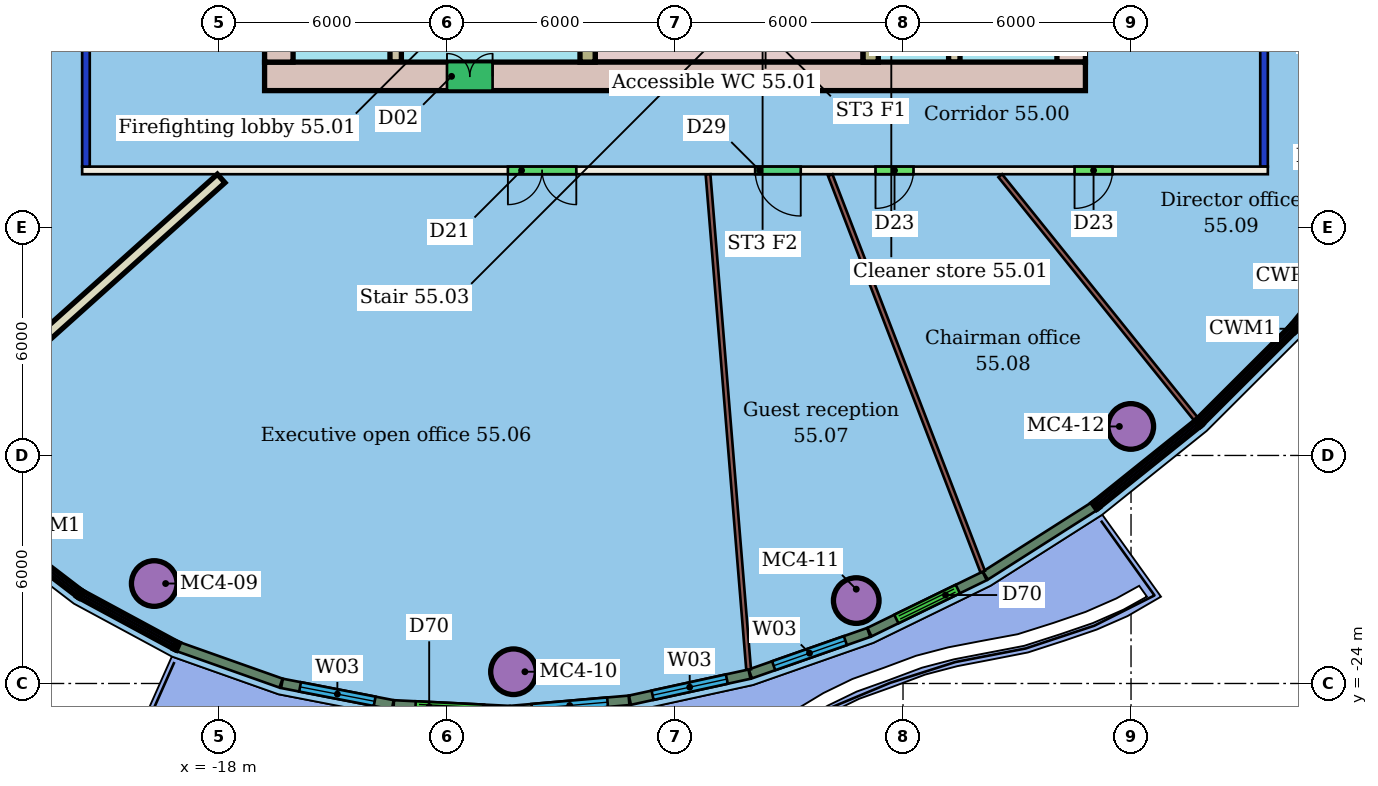
"""IFC4 building model, lengths in metres.
Left out: names, types, materials, properties, quantities, classifications, styles, units other than length and angle.
Written with IfcOpenShell. Run it as: python <this file> out.ifc"""

import sys

from ifc_helpers import new_model, si_unit, direction, frame, frame_2d, origin, origin_2d, place, context, subcontext, project, spatial, rectangle, hollow_circle, extrude, element, fill, save


model = new_model("IFC4")
c1 = context("Model", 3, precision=1e-05, world=origin(), true_north=direction((0.0, 1.0)))
c2 = subcontext(c1, "Body", "Model", "MODEL_VIEW")
j1 = project(units=[si_unit("LENGTHUNIT", "METRE"), si_unit("PLANEANGLEUNIT", "RADIAN")], contexts=[c1])
p1 = place(None, origin())
s1 = spatial("IfcSite", under=j1, at=p1, CompositionType="ELEMENT")
p2 = place(p1, origin())
s2 = spatial("IfcBuilding", under=s1, at=p2, CompositionType="ELEMENT")
p3 = place(p2, frame((0.0, 0.0, 224.5)))
s3 = spatial("IfcBuildingStorey", under=s2, at=p3, CompositionType="ELEMENT", Elevation=224.5)
for number, where, z_axis, x_axis in (
    (1, (-19.704, -21.37, 0.0), (0.0, 0.0, 1.0), (1.0, 0.0, 0.0)),
    (2, (-10.25, -23.691, 0.0), (0.0, 0.0, 1.0), (1.0, 0.0, 0.0)),
    (3, (-1.231, -21.819, 0.0), (0.0, 0.0, 1.0), (1.0, 0.0, 0.0)),
    (4, (5.993, -17.237, 0.0), (0.0, 0.0, 1.0), (1.0, 0.0, 0.0)),
):
    element("IfcColumn", number, at=place(p3, frame(where, z_axis=z_axis, x_axis=x_axis)), inside=s3, PredefinedType="COLUMN", context=c2, shape_type="SweptSolid", body=[
        extrude(hollow_circle(Radius=0.6, WallThickness=0.045, at=origin_2d()), origin(), (0.0, 0.0, 1.0), 3.45),
    ])
p4 = place(p3, frame((9.6, -10.5, 0.0), z_axis=(0.0, 0.0, 1.0), x_axis=(-1.0, 0.0, 0.0)))
e5 = element("IfcWall", 5, at=p4, inside=s3, PredefinedType="PARTITIONING", context=c2, shape_type="SweptSolid", body=[
    extrude(rectangle(XDim=31.2, YDim=0.2, at=frame_2d((15.6, 0.0))), origin(), (0.0, 0.0, 1.0), 3.45),
])
p5 = place(p4, frame((18.197, 0.0, 0.0)))
e6 = element("IfcOpeningElement", 6, at=p5, cuts=e5, PredefinedType="OPENING", context=c2, shape_type="SweptSolid", body=[
    extrude(rectangle(XDim=1.8, YDim=2.1, at=frame_2d((0.9, 1.05))), frame((0.0, 0.11, 0.0), z_axis=(0.0, -1.0, 0.0), x_axis=(1.0, 0.0, 0.0)), (0.0, 0.0, 1.0), 0.22),
])
p6 = place(p4, frame((12.291, 0.0, 0.0)))
e7 = element("IfcOpeningElement", 7, at=p6, cuts=e5, PredefinedType="OPENING", context=c2, shape_type="SweptSolid", body=[
    extrude(rectangle(XDim=1.2, YDim=2.4, at=frame_2d((0.6, 1.2))), frame((0.0, 0.11, 0.0), z_axis=(0.0, -1.0, 0.0), x_axis=(1.0, 0.0, 0.0)), (0.0, 0.0, 1.0), 0.22),
])
p7 = place(p4, frame((9.324, 0.0, 0.0)))
e8 = element("IfcOpeningElement", 8, at=p7, cuts=e5, PredefinedType="OPENING", context=c2, shape_type="SweptSolid", body=[
    extrude(rectangle(XDim=1.0, YDim=2.4, at=frame_2d((0.5, 1.2))), frame((0.0, 0.11, 0.0), z_axis=(0.0, -1.0, 0.0), x_axis=(1.0, 0.0, 0.0)), (0.0, 0.0, 1.0), 0.22),
])
p8 = place(p4, frame((4.086, 0.0, 0.0)))
e9 = element("IfcOpeningElement", 9, at=p8, cuts=e5, PredefinedType="OPENING", context=c2, shape_type="SweptSolid", body=[
    extrude(rectangle(XDim=1.0, YDim=2.4, at=frame_2d((0.5, 1.2))), frame((0.0, 0.11, 0.0), z_axis=(0.0, -1.0, 0.0), x_axis=(1.0, 0.0, 0.0)), (0.0, 0.0, 1.0), 0.22),
])
p9 = place(p3, frame((-21.5, -10.4, 0.0), z_axis=(0.0, 0.0, 1.0), x_axis=(0.0, 1.0, 0.0)))
e10 = element("IfcWall", 10, at=p9, inside=s3, PredefinedType="PARTITIONING", context=c2, shape_type="SweptSolid", body=[
    extrude(rectangle(XDim=20.8, YDim=0.2, at=frame_2d((10.4, 0.0))), origin(), (0.0, 0.0, 1.0), 3.05),
])
p10 = place(p9, frame((14.754, 0.0, 0.0)))
e11 = element("IfcOpeningElement", 11, at=p10, cuts=e10, PredefinedType="OPENING", context=c2, shape_type="SweptSolid", body=[
    extrude(rectangle(XDim=1.0, YDim=2.4, at=frame_2d((0.5, 1.2))), frame((0.0, 0.11, 0.0), z_axis=(0.0, -1.0, 0.0), x_axis=(1.0, 0.0, 0.0)), (0.0, 0.0, 1.0), 0.22),
])
p11 = place(p9, frame((7.034, 0.0, 0.0)))
e12 = element("IfcOpeningElement", 12, at=p11, cuts=e10, PredefinedType="OPENING", context=c2, shape_type="SweptSolid", body=[
    extrude(rectangle(XDim=1.8, YDim=2.4, at=frame_2d((0.9, 1.2))), frame((0.0, 0.11, 0.0), z_axis=(0.0, -1.0, 0.0), x_axis=(1.0, 0.0, 0.0)), (0.0, 0.0, 1.0), 0.22),
])
p12 = place(p3, frame((9.5, 10.4, 0.0), z_axis=(0.0, 0.0, 1.0), x_axis=(0.0, -1.0, 0.0)))
e13 = element("IfcWall", 13, at=p12, inside=s3, PredefinedType="PARTITIONING", context=c2, shape_type="SweptSolid", body=[
    extrude(rectangle(XDim=20.8, YDim=0.2, at=frame_2d((10.4, 0.0))), origin(), (0.0, 0.0, 1.0), 3.05),
])
p13 = place(p12, frame((13.631, 0.0, 0.0)))
e14 = element("IfcOpeningElement", 14, at=p13, cuts=e13, PredefinedType="OPENING", context=c2, shape_type="SweptSolid", body=[
    extrude(rectangle(XDim=0.9, YDim=2.1, at=frame_2d((0.45, 1.05))), frame((0.0, 0.11, 0.0), z_axis=(0.0, -1.0, 0.0), x_axis=(1.0, 0.0, 0.0)), (0.0, 0.0, 1.0), 0.22),
])
p14 = place(p12, frame((7.823, 0.0, 0.0)))
e15 = element("IfcOpeningElement", 15, at=p14, cuts=e13, PredefinedType="OPENING", context=c2, shape_type="SweptSolid", body=[
    extrude(rectangle(XDim=1.5, YDim=2.1, at=frame_2d((0.75, 1.05))), frame((0.0, 0.11, 0.0), z_axis=(0.0, -1.0, 0.0), x_axis=(1.0, 0.0, 0.0)), (0.0, 0.0, 1.0), 0.22),
])
p15 = place(p3, frame((-25.794, -17.754, 0.0), z_axis=(0.0, 0.0, 1.0), x_axis=(0.744431366547, 0.667698989441, 0.0)))
e16 = element("IfcWall", 16, at=p15, inside=s3, PredefinedType="PARTITIONING", context=c2, shape_type="SweptSolid", body=[
    extrude(rectangle(XDim=10.547, YDim=0.3, at=frame_2d((5.274, 0.0))), origin(), (0.0, 0.0, 1.0), 3.45),
])
p16 = place(p3, frame((-4.063, -23.631, 0.0), z_axis=(0.0, 0.0, 1.0), x_axis=(-0.081688068258, 0.996657945087, 0.0)))
e17 = element("IfcWall", 17, at=p16, inside=s3, PredefinedType="PARTITIONING", context=c2, shape_type="SweptSolid", body=[
    extrude(rectangle(XDim=13.07, YDim=0.125, at=frame_2d((6.535, 0.0))), origin(), (0.0, 0.0, 1.0), 3.45),
])
p17 = place(p3, frame((2.097, -21.057, 0.0), z_axis=(0.0, 0.0, 1.0), x_axis=(-0.35890151598, 0.933375434553, 0.0)))
e18 = element("IfcWall", 18, at=p17, inside=s3, PredefinedType="PARTITIONING", context=c2, shape_type="SweptSolid", body=[
    extrude(rectangle(XDim=11.179, YDim=0.125, at=frame_2d((5.59, 0.0))), origin(), (0.0, 0.0, 1.0), 3.45),
])
p18 = place(p3, frame((7.706, -17.038, 0.0), z_axis=(0.0, 0.0, 1.0), x_axis=(-0.626795529624, 0.77918378066, 0.0)))
e19 = element("IfcWall", 19, at=p18, inside=s3, PredefinedType="PARTITIONING", context=c2, shape_type="SweptSolid", body=[
    extrude(rectangle(XDim=8.212, YDim=0.125, at=frame_2d((4.106, 0.0))), origin(), (0.0, 0.0, 1.0), 3.45),
])
p19 = place(p3, frame((14.257, -8.927, 0.0), z_axis=(0.0, 0.0, 1.0), x_axis=(-0.915078040673, 0.403276802555, 0.0)))
e20 = element("IfcWall", 20, at=p19, inside=s3, PredefinedType="PARTITIONING", context=c2, shape_type="SweptSolid", body=[
    extrude(rectangle(XDim=5.062, YDim=0.125, at=frame_2d((2.531, 0.0))), origin(), (0.0, 0.0, 1.0), 3.45),
])
p20 = place(p3, frame((-19.066, -23.035, 0.0), z_axis=(0.0, 0.0, 1.0), x_axis=(0.942660771922, -0.333752406852, 0.0)))
e21 = element("IfcWall", 21, at=p20, inside=s3, PredefinedType="SOLIDWALL", context=c2, shape_type="SweptSolid", body=[
    extrude(rectangle(XDim=2.862, YDim=0.25, at=frame_2d((1.431, 0.0))), origin(), (0.0, 0.0, 1.0), 3.1),
])
p21 = place(p3, frame((-16.342, -23.997, 0.0), z_axis=(0.0, 0.0, 1.0), x_axis=(0.981754609907, -0.190152270366, 0.0)))
e22 = element("IfcWall", 22, at=p21, inside=s3, PredefinedType="SOLIDWALL", context=c2, shape_type="SweptSolid", body=[
    extrude(rectangle(XDim=2.97, YDim=0.25, at=frame_2d((1.485, 0.0))), origin(), (0.0, 0.0, 1.0), 3.1),
])
p22 = place(p21, frame((0.485, 0.0, 0.9)))
e23 = element("IfcOpeningElement", 23, at=p22, cuts=e22, PredefinedType="OPENING", context=c2, shape_type="SweptSolid", body=[
    extrude(rectangle(XDim=2.0, YDim=2.1, at=frame_2d((1.0, 1.05))), frame((0.0, 0.135, 0.0), z_axis=(0.0, -1.0, 0.0), x_axis=(1.0, 0.0, 0.0)), (0.0, 0.0, 1.0), 0.27),
])
p23 = place(p3, frame((-13.401, -24.565, 0.0), z_axis=(0.0, 0.0, 1.0), x_axis=(0.99880196675, -0.048934969263, 0.0)))
e24 = element("IfcWall", 24, at=p23, inside=s3, PredefinedType="SOLIDWALL", context=c2, shape_type="SweptSolid", body=[
    extrude(rectangle(XDim=3.048, YDim=0.25, at=frame_2d((1.524, 0.0))), origin(), (0.0, 0.0, 1.0), 3.1),
])
p24 = place(p23, frame((0.574, 0.0, 0.0)))
e25 = element("IfcOpeningElement", 25, at=p24, cuts=e24, PredefinedType="OPENING", context=c2, shape_type="SweptSolid", body=[
    extrude(rectangle(XDim=1.8, YDim=2.4, at=frame_2d((0.9, 1.2))), frame((0.0, 0.135, 0.0), z_axis=(0.0, -1.0, 0.0), x_axis=(1.0, 0.0, 0.0)), (0.0, 0.0, 1.0), 0.27),
])
p25 = place(p3, frame((-10.332, -24.713, 0.0), z_axis=(0.0, 0.0, 1.0), x_axis=(0.996280822504, 0.086165670135, 0.0)))
e26 = element("IfcWall", 26, at=p25, inside=s3, PredefinedType="SOLIDWALL", context=c2, shape_type="SweptSolid", body=[
    extrude(rectangle(XDim=3.134, YDim=0.25, at=frame_2d((1.567, 0.0))), origin(), (0.0, 0.0, 1.0), 3.1),
])
p26 = place(p25, frame((0.567, 0.0, 0.9)))
e27 = element("IfcOpeningElement", 27, at=p26, cuts=e26, PredefinedType="OPENING", context=c2, shape_type="SweptSolid", body=[
    extrude(rectangle(XDim=2.0, YDim=2.1, at=frame_2d((1.0, 1.05))), frame((0.0, 0.135, 0.0), z_axis=(0.0, -1.0, 0.0), x_axis=(1.0, 0.0, 0.0)), (0.0, 0.0, 1.0), 0.27),
])
p27 = place(p3, frame((-7.186, -24.44, 0.0), z_axis=(0.0, 0.0, 1.0), x_axis=(0.977051639929, 0.213002565507, 0.0)))
e28 = element("IfcWall", 28, at=p27, inside=s3, PredefinedType="SOLIDWALL", context=c2, shape_type="SweptSolid", body=[
    extrude(rectangle(XDim=3.22, YDim=0.25, at=frame_2d((1.61, 0.0))), origin(), (0.0, 0.0, 1.0), 3.1),
])
p28 = place(p27, frame((0.61, 0.0, 0.9)))
e29 = element("IfcOpeningElement", 29, at=p28, cuts=e28, PredefinedType="OPENING", context=c2, shape_type="SweptSolid", body=[
    extrude(rectangle(XDim=2.0, YDim=2.1, at=frame_2d((1.0, 1.05))), frame((0.0, 0.135, 0.0), z_axis=(0.0, -1.0, 0.0), x_axis=(1.0, 0.0, 0.0)), (0.0, 0.0, 1.0), 0.27),
])
p29 = place(p3, frame((-4.018, -23.748, 0.0), z_axis=(0.0, 0.0, 1.0), x_axis=(0.943819136109, 0.330462461279, 0.0)))
e30 = element("IfcWall", 30, at=p29, inside=s3, PredefinedType="SOLIDWALL", context=c2, shape_type="SweptSolid", body=[
    extrude(rectangle(XDim=3.3, YDim=0.25, at=frame_2d((1.65, 0.0))), origin(), (0.0, 0.0, 1.0), 3.1),
])
p30 = place(p29, frame((0.65, 0.0, 0.9)))
e31 = element("IfcOpeningElement", 31, at=p30, cuts=e30, PredefinedType="OPENING", context=c2, shape_type="SweptSolid", body=[
    extrude(rectangle(XDim=2.0, YDim=2.1, at=frame_2d((1.0, 1.05))), frame((0.0, 0.135, 0.0), z_axis=(0.0, -1.0, 0.0), x_axis=(1.0, 0.0, 0.0)), (0.0, 0.0, 1.0), 0.27),
])
p31 = place(p3, frame((-0.882, -22.648, 0.0), z_axis=(0.0, 0.0, 1.0), x_axis=(0.898829687596, 0.43829806376, 0.0)))
e32 = element("IfcWall", 32, at=p31, inside=s3, PredefinedType="SOLIDWALL", context=c2, shape_type="SweptSolid", body=[
    extrude(rectangle(XDim=3.371, YDim=0.25, at=frame_2d((1.686, 0.0))), origin(), (0.0, 0.0, 1.0), 3.1),
])
p32 = place(p31, frame((0.786, 0.0, 0.0)))
e33 = element("IfcOpeningElement", 33, at=p32, cuts=e32, PredefinedType="OPENING", context=c2, shape_type="SweptSolid", body=[
    extrude(rectangle(XDim=1.8, YDim=2.4, at=frame_2d((0.9, 1.2))), frame((0.0, 0.135, 0.0), z_axis=(0.0, -1.0, 0.0), x_axis=(1.0, 0.0, 0.0)), (0.0, 0.0, 1.0), 0.27),
])
p33 = place(p3, frame((2.167, -21.16, 0.0), z_axis=(0.0, 0.0, 1.0), x_axis=(0.843780310555, 0.536688724979, 0.0)))
e34 = element("IfcWall", 34, at=p33, inside=s3, PredefinedType="SOLIDWALL", context=c2, shape_type="SweptSolid", body=[
    extrude(rectangle(XDim=3.384, YDim=0.25, at=frame_2d((1.692, 0.0))), origin(), (0.0, 0.0, 1.0), 3.1),
])
p34 = place(p3, frame((-16.8, -8.025, 0.0), z_axis=(0.0, 0.0, 1.0), x_axis=(1.0, 0.0, 0.0)))
e35 = element("IfcWall", 35, at=p34, inside=s3, PredefinedType="SHEAR", context=c2, shape_type="SweptSolid", body=[
    extrude(rectangle(XDim=21.6, YDim=0.75, at=frame_2d((10.8, 0.0))), origin(), (0.0, 0.0, 1.0), 3.3),
])
p35 = place(p34, frame((4.8, 0.0, 0.0)))
e36 = element("IfcOpeningElement", 36, at=p35, cuts=e35, PredefinedType="OPENING", context=c2, shape_type="SweptSolid", body=[
    extrude(rectangle(XDim=1.2, YDim=2.1, at=frame_2d((0.6, 1.05))), frame((0.0, 0.385, 0.0), z_axis=(0.0, -1.0, 0.0), x_axis=(1.0, 0.0, 0.0)), (0.0, 0.0, 1.0), 0.77),
])
p36 = place(p3, frame((-16.425, 7.65, 0.0), z_axis=(0.0, 0.0, 1.0), x_axis=(0.0, -1.0, 0.0)))
e37 = element("IfcWall", 37, at=p36, inside=s3, PredefinedType="SHEAR", context=c2, shape_type="SweptSolid", body=[
    extrude(rectangle(XDim=15.3, YDim=0.75, at=frame_2d((7.65, 0.0))), origin(), (0.0, 0.0, 1.0), 3.3),
])
p37 = place(p36, frame((11.25, 0.0, 0.0)))
e38 = element("IfcOpeningElement", 38, at=p37, cuts=e37, PredefinedType="OPENING", context=c2, shape_type="SweptSolid", body=[
    extrude(rectangle(XDim=1.2, YDim=2.1, at=frame_2d((0.6, 1.05))), frame((0.0, 0.385, 0.0), z_axis=(0.0, -1.0, 0.0), x_axis=(1.0, 0.0, 0.0)), (0.0, 0.0, 1.0), 0.77),
])
p38 = place(p36, frame((2.85, 0.0, 0.0)))
e39 = element("IfcOpeningElement", 39, at=p38, cuts=e37, PredefinedType="OPENING", context=c2, shape_type="SweptSolid", body=[
    extrude(rectangle(XDim=1.2, YDim=2.1, at=frame_2d((0.6, 1.05))), frame((0.0, 0.385, 0.0), z_axis=(0.0, -1.0, 0.0), x_axis=(1.0, 0.0, 0.0)), (0.0, 0.0, 1.0), 0.77),
])
p39 = place(p3, frame((4.425, -7.65, 0.0), z_axis=(0.0, 0.0, 1.0), x_axis=(0.0, 1.0, 0.0)))
e40 = element("IfcWall", 40, at=p39, inside=s3, PredefinedType="SHEAR", context=c2, shape_type="SweptSolid", body=[
    extrude(rectangle(XDim=15.3, YDim=0.75, at=frame_2d((7.65, 0.0))), origin(), (0.0, 0.0, 1.0), 3.3),
])
p40 = place(p39, frame((2.85, 0.0, 0.0)))
e41 = element("IfcOpeningElement", 41, at=p40, cuts=e40, PredefinedType="OPENING", context=c2, shape_type="SweptSolid", body=[
    extrude(rectangle(XDim=1.2, YDim=2.1, at=frame_2d((0.6, 1.05))), frame((0.0, 0.385, 0.0), z_axis=(0.0, -1.0, 0.0), x_axis=(1.0, 0.0, 0.0)), (0.0, 0.0, 1.0), 0.77),
])
p41 = place(p39, frame((11.25, 0.0, 0.0)))
e42 = element("IfcOpeningElement", 42, at=p41, cuts=e40, PredefinedType="OPENING", context=c2, shape_type="SweptSolid", body=[
    extrude(rectangle(XDim=1.2, YDim=2.1, at=frame_2d((0.6, 1.05))), frame((0.0, 0.385, 0.0), z_axis=(0.0, -1.0, 0.0), x_axis=(1.0, 0.0, 0.0)), (0.0, 0.0, 1.0), 0.77),
])
p42 = place(p3, frame((-13.35, 7.65, 0.0), z_axis=(0.0, 0.0, 1.0), x_axis=(0.0, -1.0, 0.0)))
e43 = element("IfcWall", 43, at=p42, inside=s3, PredefinedType="SHEAR", context=c2, shape_type="SweptSolid", body=[
    extrude(rectangle(XDim=15.3, YDim=0.3, at=frame_2d((7.65, 0.0))), origin(), (0.0, 0.0, 1.0), 3.3),
])
p43 = place(p42, frame((6.9, 0.0, 0.0)))
e44 = element("IfcOpeningElement", 44, at=p43, cuts=e43, PredefinedType="OPENING", context=c2, shape_type="SweptSolid", body=[
    extrude(rectangle(XDim=1.5, YDim=2.1, at=frame_2d((0.75, 1.05))), frame((0.0, 0.16, 0.0), z_axis=(0.0, -1.0, 0.0), x_axis=(1.0, 0.0, 0.0)), (0.0, 0.0, 1.0), 0.32),
])
p44 = place(p3, frame((1.35, -7.65, 0.0), z_axis=(0.0, 0.0, 1.0), x_axis=(0.0, 1.0, 0.0)))
e45 = element("IfcWall", 45, at=p44, inside=s3, PredefinedType="SHEAR", context=c2, shape_type="SweptSolid", body=[
    extrude(rectangle(XDim=15.3, YDim=0.3, at=frame_2d((7.65, 0.0))), origin(), (0.0, 0.0, 1.0), 3.3),
])
p45 = place(p44, frame((1.56, 0.0, 0.0)))
e46 = element("IfcOpeningElement", 46, at=p45, cuts=e45, PredefinedType="OPENING", context=c2, shape_type="SweptSolid", body=[
    extrude(rectangle(XDim=1.0, YDim=2.1, at=frame_2d((0.5, 1.05))), frame((0.0, 0.16, 0.0), z_axis=(0.0, -1.0, 0.0), x_axis=(1.0, 0.0, 0.0)), (0.0, 0.0, 1.0), 0.32),
])
p46 = place(p44, frame((6.9, 0.0, 0.0)))
e47 = element("IfcOpeningElement", 47, at=p46, cuts=e45, PredefinedType="OPENING", context=c2, shape_type="SweptSolid", body=[
    extrude(rectangle(XDim=1.5, YDim=2.1, at=frame_2d((0.75, 1.05))), frame((0.0, 0.16, 0.0), z_axis=(0.0, -1.0, 0.0), x_axis=(1.0, 0.0, 0.0)), (0.0, 0.0, 1.0), 0.32),
])
p47 = place(p3, frame((-8.3, -3.88, 0.0), z_axis=(0.0, 0.0, 1.0), x_axis=(0.0, -1.0, 0.0)))
e48 = element("IfcWall", 48, at=p47, inside=s3, PredefinedType="SHEAR", context=c2, shape_type="SweptSolid", body=[
    extrude(rectangle(XDim=3.77, YDim=0.4, at=frame_2d((1.885, 0.0))), origin(), (0.0, 0.0, 1.0), 3.3),
])
p48 = place(p47, frame((1.11, 0.0, 0.0)))
e49 = element("IfcOpeningElement", 49, at=p48, cuts=e48, PredefinedType="OPENING", context=c2, shape_type="SweptSolid", body=[
    extrude(rectangle(XDim=1.2, YDim=2.1, at=frame_2d((0.6, 1.05))), frame((0.0, 0.21, 0.0), z_axis=(0.0, -1.0, 0.0), x_axis=(1.0, 0.0, 0.0)), (0.0, 0.0, 1.0), 0.42),
])
p49 = place(p3, frame((-0.85, -3.88, 0.0), z_axis=(0.0, 0.0, 1.0), x_axis=(0.0, -1.0, 0.0)))
e50 = element("IfcWall", 50, at=p49, inside=s3, PredefinedType="SHEAR", context=c2, shape_type="SweptSolid", body=[
    extrude(rectangle(XDim=3.77, YDim=0.4, at=frame_2d((1.885, 0.0))), origin(), (0.0, 0.0, 1.0), 3.3),
])
p50 = place(p3, frame((-8.1, -7.475, 0.0), z_axis=(0.0, 0.0, 1.0), x_axis=(1.0, 0.0, 0.0)))
e51 = element("IfcWall", 51, at=p50, inside=s3, PredefinedType="SHEAR", context=c2, shape_type="SweptSolid", body=[
    extrude(rectangle(XDim=7.05, YDim=0.35, at=frame_2d((3.525, 0.0))), origin(), (0.0, 0.0, 1.0), 3.3),
])
p51 = place(p5, origin())
e52 = element("IfcDoor", 52, at=p51, inside=s3, OperationType="DOUBLE_DOOR_SINGLE_SWING", PredefinedType="DOOR", context=c2, shape_type="SweptSolid", body=[
    extrude(rectangle(XDim=1.8, YDim=2.1, at=frame_2d((0.9, 1.05))), frame((0.0, 0.025, 0.0), z_axis=(0.0, -1.0, 0.0), x_axis=(1.0, 0.0, 0.0)), (0.0, 0.0, 1.0), 0.05),
])
fill(e6, e52)
p52 = place(p6, origin())
e53 = element("IfcDoor", 53, at=p52, inside=s3, OperationType="SINGLE_SWING_LEFT", PredefinedType="DOOR", context=c2, shape_type="SweptSolid", body=[
    extrude(rectangle(XDim=1.2, YDim=2.4, at=frame_2d((0.6, 1.2))), frame((0.0, 0.025, 0.0), z_axis=(0.0, -1.0, 0.0), x_axis=(1.0, 0.0, 0.0)), (0.0, 0.0, 1.0), 0.05),
])
fill(e7, e53)
p53 = place(p7, origin())
e54 = element("IfcDoor", 54, at=p53, inside=s3, OperationType="SINGLE_SWING_RIGHT", PredefinedType="DOOR", context=c2, shape_type="SweptSolid", body=[
    extrude(rectangle(XDim=1.0, YDim=2.4, at=frame_2d((0.5, 1.2))), frame((0.0, 0.025, 0.0), z_axis=(0.0, -1.0, 0.0), x_axis=(1.0, 0.0, 0.0)), (0.0, 0.0, 1.0), 0.05),
])
fill(e8, e54)
p54 = place(p8, origin())
e55 = element("IfcDoor", 55, at=p54, inside=s3, OperationType="SINGLE_SWING_RIGHT", PredefinedType="DOOR", context=c2, shape_type="SweptSolid", body=[
    extrude(rectangle(XDim=1.0, YDim=2.4, at=frame_2d((0.5, 1.2))), frame((0.0, 0.025, 0.0), z_axis=(0.0, -1.0, 0.0), x_axis=(1.0, 0.0, 0.0)), (0.0, 0.0, 1.0), 0.05),
])
fill(e9, e55)
p55 = place(p22, origin())
e56 = element("IfcWindow", 56, at=p55, inside=s3, PartitioningType="SINGLE_PANEL", PredefinedType="WINDOW", context=c2, shape_type="SweptSolid", body=[
    extrude(rectangle(XDim=2.0, YDim=2.1, at=frame_2d((1.0, 1.05))), frame((0.0, 0.03, 0.0), z_axis=(0.0, -1.0, 0.0), x_axis=(1.0, 0.0, 0.0)), (0.0, 0.0, 1.0), 0.06),
])
fill(e23, e56)
p56 = place(p24, origin())
e57 = element("IfcDoor", 57, at=p56, inside=s3, OperationType="DOUBLE_DOOR_SLIDING", PredefinedType="DOOR", context=c2, shape_type="SweptSolid", body=[
    extrude(rectangle(XDim=1.8, YDim=2.4, at=frame_2d((0.9, 1.2))), frame((0.0, 0.025, 0.0), z_axis=(0.0, -1.0, 0.0), x_axis=(1.0, 0.0, 0.0)), (0.0, 0.0, 1.0), 0.05),
])
fill(e25, e57)
p57 = place(p26, origin())
e58 = element("IfcWindow", 58, at=p57, inside=s3, PartitioningType="SINGLE_PANEL", PredefinedType="WINDOW", context=c2, shape_type="SweptSolid", body=[
    extrude(rectangle(XDim=2.0, YDim=2.1, at=frame_2d((1.0, 1.05))), frame((0.0, 0.03, 0.0), z_axis=(0.0, -1.0, 0.0), x_axis=(1.0, 0.0, 0.0)), (0.0, 0.0, 1.0), 0.06),
])
fill(e27, e58)
p58 = place(p28, origin())
e59 = element("IfcWindow", 59, at=p58, inside=s3, PartitioningType="SINGLE_PANEL", PredefinedType="WINDOW", context=c2, shape_type="SweptSolid", body=[
    extrude(rectangle(XDim=2.0, YDim=2.1, at=frame_2d((1.0, 1.05))), frame((0.0, 0.03, 0.0), z_axis=(0.0, -1.0, 0.0), x_axis=(1.0, 0.0, 0.0)), (0.0, 0.0, 1.0), 0.06),
])
fill(e29, e59)
p59 = place(p30, origin())
e60 = element("IfcWindow", 60, at=p59, inside=s3, PartitioningType="SINGLE_PANEL", PredefinedType="WINDOW", context=c2, shape_type="SweptSolid", body=[
    extrude(rectangle(XDim=2.0, YDim=2.1, at=frame_2d((1.0, 1.05))), frame((0.0, 0.03, 0.0), z_axis=(0.0, -1.0, 0.0), x_axis=(1.0, 0.0, 0.0)), (0.0, 0.0, 1.0), 0.06),
])
fill(e31, e60)
p60 = place(p32, origin())
e61 = element("IfcDoor", 61, at=p60, inside=s3, OperationType="DOUBLE_DOOR_SLIDING", PredefinedType="DOOR", context=c2, shape_type="SweptSolid", body=[
    extrude(rectangle(XDim=1.8, YDim=2.4, at=frame_2d((0.9, 1.2))), frame((0.0, 0.025, 0.0), z_axis=(0.0, -1.0, 0.0), x_axis=(1.0, 0.0, 0.0)), (0.0, 0.0, 1.0), 0.05),
])
fill(e33, e61)
p61 = place(p35, origin())
e62 = element("IfcDoor", 62, at=p61, inside=s3, OperationType="DOUBLE_DOOR_SINGLE_SWING", PredefinedType="NOTDEFINED", context=c2, shape_type="SweptSolid", body=[
    extrude(rectangle(XDim=1.2, YDim=2.1, at=frame_2d((0.6, 1.05))), frame((0.0, 0.025, 0.0), z_axis=(0.0, -1.0, 0.0), x_axis=(1.0, 0.0, 0.0)), (0.0, 0.0, 1.0), 0.05),
])
fill(e36, e62)
save(model, sys.argv[1])
